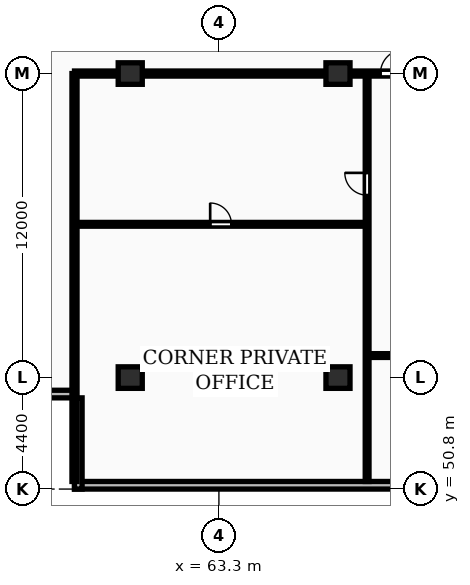
"""IFC4 building model, lengths in metres.
Left out: names, types, materials, properties, quantities, classifications, styles, units other than length and angle.
Written with IfcOpenShell. Run it as: python <this file> out.ifc"""

import sys

from ifc_helpers import new_model, si_unit, direction, frame, frame_2d, origin, origin_2d, place, context, subcontext, project, spatial, rectangle, extrude, element, fill, save


model = new_model("IFC4")
c1 = context("Model", 3, precision=1e-05, world=origin(), true_north=direction((0.0, 1.0)))
c2 = subcontext(c1, "Body", "Model", "MODEL_VIEW")
j1 = project(units=[si_unit("LENGTHUNIT", "METRE"), si_unit("PLANEANGLEUNIT", "RADIAN")], contexts=[c1])
p1 = place(None, origin())
s1 = spatial("IfcSite", under=j1, at=p1, CompositionType="ELEMENT")
p2 = place(p1, origin())
s2 = spatial("IfcBuilding", under=s1, at=p2, CompositionType="ELEMENT")
p3 = place(p2, frame((0.0, 0.0, 119.8)))
s3 = spatial("IfcBuildingStorey", under=s2, at=p3, CompositionType="ELEMENT", Elevation=119.8)
for number, where, z_axis, x_axis in (
    (1, (59.8, 55.2, 0.0), (0.0, 0.0, 1.0), (1.0, 0.0, 0.0)),
    (2, (59.8, 67.2, 0.0), (0.0, 0.0, 1.0), (1.0, 0.0, 0.0)),
    (3, (68.0, 55.2, 0.0), (0.0, 0.0, 1.0), (1.0, 0.0, 0.0)),
    (4, (68.0, 67.2, 0.0), (0.0, 0.0, 1.0), (1.0, 0.0, 0.0)),
):
    element("IfcColumn", number, at=place(p3, frame(where, z_axis=z_axis, x_axis=x_axis)), inside=s3, PredefinedType="COLUMN", context=c2, shape_type="SweptSolid", body=[
        extrude(rectangle(XDim=0.95, YDim=0.85, at=origin_2d()), origin(), (0.0, 0.0, 1.0), 3.25),
    ])
p4 = place(p3, frame((57.6, 50.95, 0.0), z_axis=(0.0, 0.0, 1.0), x_axis=(1.0, 0.0, 0.0)))
e5 = element("IfcWall", 5, at=p4, inside=s3, PredefinedType="STANDARD", context=c2, shape_type="SweptSolid", body=[
    extrude(rectangle(XDim=73.0, YDim=0.3, at=frame_2d((36.5, 0.0))), origin(), (0.0, 0.0, 1.0), 2.97),
])
p5 = place(p4, frame((15.225, 0.0, 0.85)))
e6 = element("IfcOpeningElement", 6, at=p5, cuts=e5, PredefinedType="OPENING", context=c2, shape_type="SweptSolid", body=[
    extrude(rectangle(XDim=1.8, YDim=1.8, at=frame_2d((0.9, 0.9))), frame((0.0, 0.16, 0.0), z_axis=(0.0, -1.0, 0.0), x_axis=(1.0, 0.0, 0.0)), (0.0, 0.0, 1.0), 0.32),
])
p6 = place(p4, frame((58.575, 0.0, 0.85)))
e7 = element("IfcOpeningElement", 7, at=p6, cuts=e5, PredefinedType="OPENING", context=c2, shape_type="SweptSolid", body=[
    extrude(rectangle(XDim=1.8, YDim=1.8, at=frame_2d((0.9, 0.9))), frame((0.0, 0.16, 0.0), z_axis=(0.0, -1.0, 0.0), x_axis=(1.0, 0.0, 0.0)), (0.0, 0.0, 1.0), 0.32),
])
p7 = place(p3, frame((54.0, 54.55, 0.0), z_axis=(0.0, 0.0, 1.0), x_axis=(1.0, 0.0, 0.0)))
e8 = element("IfcWall", 8, at=p7, inside=s3, PredefinedType="STANDARD", context=c2, shape_type="SweptSolid", body=[
    extrude(rectangle(XDim=3.6, YDim=0.3, at=frame_2d((1.8, 0.0))), origin(), (0.0, 0.0, 1.0), 2.97),
])
p8 = place(p3, frame((57.75, 54.4, 0.0), z_axis=(0.0, 0.0, 1.0), x_axis=(0.0, -1.0, 0.0)))
e9 = element("IfcWall", 9, at=p8, inside=s3, PredefinedType="STANDARD", context=c2, shape_type="SweptSolid", body=[
    extrude(rectangle(XDim=3.6, YDim=0.3, at=frame_2d((1.8, 0.0))), origin(), (0.0, 0.0, 1.0), 2.97),
])
p9 = place(p3, frame((57.6, 51.1, 0.0), z_axis=(0.0, 0.0, 1.0), x_axis=(0.0, 1.0, 0.0)))
e10 = element("IfcWall", 10, at=p9, inside=s3, PredefinedType="PARTITIONING", context=c2, shape_type="SweptSolid", body=[
    extrude(rectangle(XDim=16.1, YDim=0.2, at=frame_2d((8.05, 0.0))), origin(), (0.0, 0.0, 1.0), 2.97),
])
p10 = place(p3, frame((57.6, 61.25, 0.0), z_axis=(0.0, 0.0, 1.0), x_axis=(1.0, 0.0, 0.0)))
e11 = element("IfcWall", 11, at=p10, inside=s3, PredefinedType="PARTITIONING", context=c2, shape_type="SweptSolid", body=[
    extrude(rectangle(XDim=11.55, YDim=0.15, at=frame_2d((5.775, 0.0))), origin(), (0.0, 0.0, 1.0), 2.97),
])
p11 = place(p10, frame((5.355, 0.0, 0.0)))
e12 = element("IfcOpeningElement", 12, at=p11, cuts=e11, PredefinedType="OPENING", context=c2, shape_type="SweptSolid", body=[
    extrude(rectangle(XDim=0.84, YDim=2.04, at=frame_2d((0.42, 1.02))), frame((0.0, 0.085, 0.0), z_axis=(0.0, -1.0, 0.0), x_axis=(1.0, 0.0, 0.0)), (0.0, 0.0, 1.0), 0.17),
])
p12 = place(p3, frame((69.15, 51.1, 0.0), z_axis=(0.0, 0.0, 1.0), x_axis=(0.0, 1.0, 0.0)))
e13 = element("IfcWall", 13, at=p12, inside=s3, PredefinedType="PARTITIONING", context=c2, shape_type="SweptSolid", body=[
    extrude(rectangle(XDim=16.05, YDim=0.15, at=frame_2d((8.025, 0.0))), origin(), (0.0, 0.0, 1.0), 2.97),
])
p13 = place(p12, frame((11.3, 0.0, 0.0)))
e14 = element("IfcOpeningElement", 14, at=p13, cuts=e13, PredefinedType="OPENING", context=c2, shape_type="SweptSolid", body=[
    extrude(rectangle(XDim=0.88, YDim=2.06, at=frame_2d((0.44, 1.03))), frame((0.0, 0.085, 0.0), z_axis=(0.0, -1.0, 0.0), x_axis=(1.0, 0.0, 0.0)), (0.0, 0.0, 1.0), 0.17),
])
p14 = place(p3, frame((69.17, 56.07, 0.0), z_axis=(0.0, 0.0, 1.0), x_axis=(1.0, 0.0, 0.0)))
e15 = element("IfcWall", 15, at=p14, inside=s3, PredefinedType="PARTITIONING", context=c2, shape_type="SweptSolid", body=[
    extrude(rectangle(XDim=6.76, YDim=0.15, at=frame_2d((3.38, 0.0))), origin(), (0.0, 0.0, 1.0), 2.97),
])
p15 = place(p14, frame((1.362, 0.0, 0.0)))
e16 = element("IfcOpeningElement", 16, at=p15, cuts=e15, PredefinedType="OPENING", context=c2, shape_type="SweptSolid", body=[
    extrude(rectangle(XDim=0.84, YDim=2.04, at=frame_2d((0.42, 1.02))), frame((0.0, 0.085, 0.0), z_axis=(0.0, -1.0, 0.0), x_axis=(1.0, 0.0, 0.0)), (0.0, 0.0, 1.0), 0.17),
])
p16 = place(p14, frame((4.277, 0.0, 0.0)))
e17 = element("IfcOpeningElement", 17, at=p16, cuts=e15, PredefinedType="OPENING", context=c2, shape_type="SweptSolid", body=[
    extrude(rectangle(XDim=0.88, YDim=2.06, at=frame_2d((0.44, 1.03))), frame((0.0, 0.085, 0.0), z_axis=(0.0, -1.0, 0.0), x_axis=(1.0, 0.0, 0.0)), (0.0, 0.0, 1.0), 0.17),
])
p17 = place(p3, frame((57.6, 67.2, 0.0), z_axis=(0.0, 0.0, 1.0), x_axis=(1.0, 0.0, 0.0)))
e18 = element("IfcWall", 18, at=p17, inside=s3, PredefinedType="PARTITIONING", context=c2, shape_type="SweptSolid", body=[
    extrude(rectangle(XDim=18.35, YDim=0.2, at=frame_2d((9.175, 0.0))), origin(), (0.0, 0.0, 1.0), 2.433),
])
p18 = place(p17, frame((12.075, 0.0, 0.0)))
e19 = element("IfcOpeningElement", 19, at=p18, cuts=e18, PredefinedType="OPENING", context=c2, shape_type="SweptSolid", body=[
    extrude(rectangle(XDim=0.95, YDim=2.15, at=frame_2d((0.475, 1.075))), frame((0.0, 0.11, 0.0), z_axis=(0.0, -1.0, 0.0), x_axis=(1.0, 0.0, 0.0)), (0.0, 0.0, 1.0), 0.22),
])
p19 = place(p11, origin())
e20 = element("IfcDoor", 20, at=p19, inside=s3, OperationType="SINGLE_SWING_LEFT", PredefinedType="DOOR", context=c2, shape_type="SweptSolid", body=[
    extrude(rectangle(XDim=0.84, YDim=2.04, at=frame_2d((0.42, 1.02))), frame((0.0, 0.025, 0.0), z_axis=(0.0, -1.0, 0.0), x_axis=(1.0, 0.0, 0.0)), (0.0, 0.0, 1.0), 0.05),
])
fill(e12, e20)
p20 = place(p13, origin())
e21 = element("IfcDoor", 21, at=p20, inside=s3, OperationType="SINGLE_SWING_RIGHT", PredefinedType="DOOR", context=c2, shape_type="SweptSolid", body=[
    extrude(rectangle(XDim=0.88, YDim=2.06, at=frame_2d((0.44, 1.03))), frame((0.0, 0.025, 0.0), z_axis=(0.0, -1.0, 0.0), x_axis=(1.0, 0.0, 0.0)), (0.0, 0.0, 1.0), 0.05),
])
fill(e14, e21)
p21 = place(p18, origin())
e22 = element("IfcDoor", 22, at=p21, inside=s3, OperationType="SINGLE_SWING_RIGHT", PredefinedType="DOOR", context=c2, shape_type="SweptSolid", body=[
    extrude(rectangle(XDim=0.95, YDim=2.15, at=frame_2d((0.475, 1.075))), frame((0.0, 0.025, 0.0), z_axis=(0.0, -1.0, 0.0), x_axis=(1.0, 0.0, 0.0)), (0.0, 0.0, 1.0), 0.05),
])
fill(e19, e22)
save(model, sys.argv[1])
